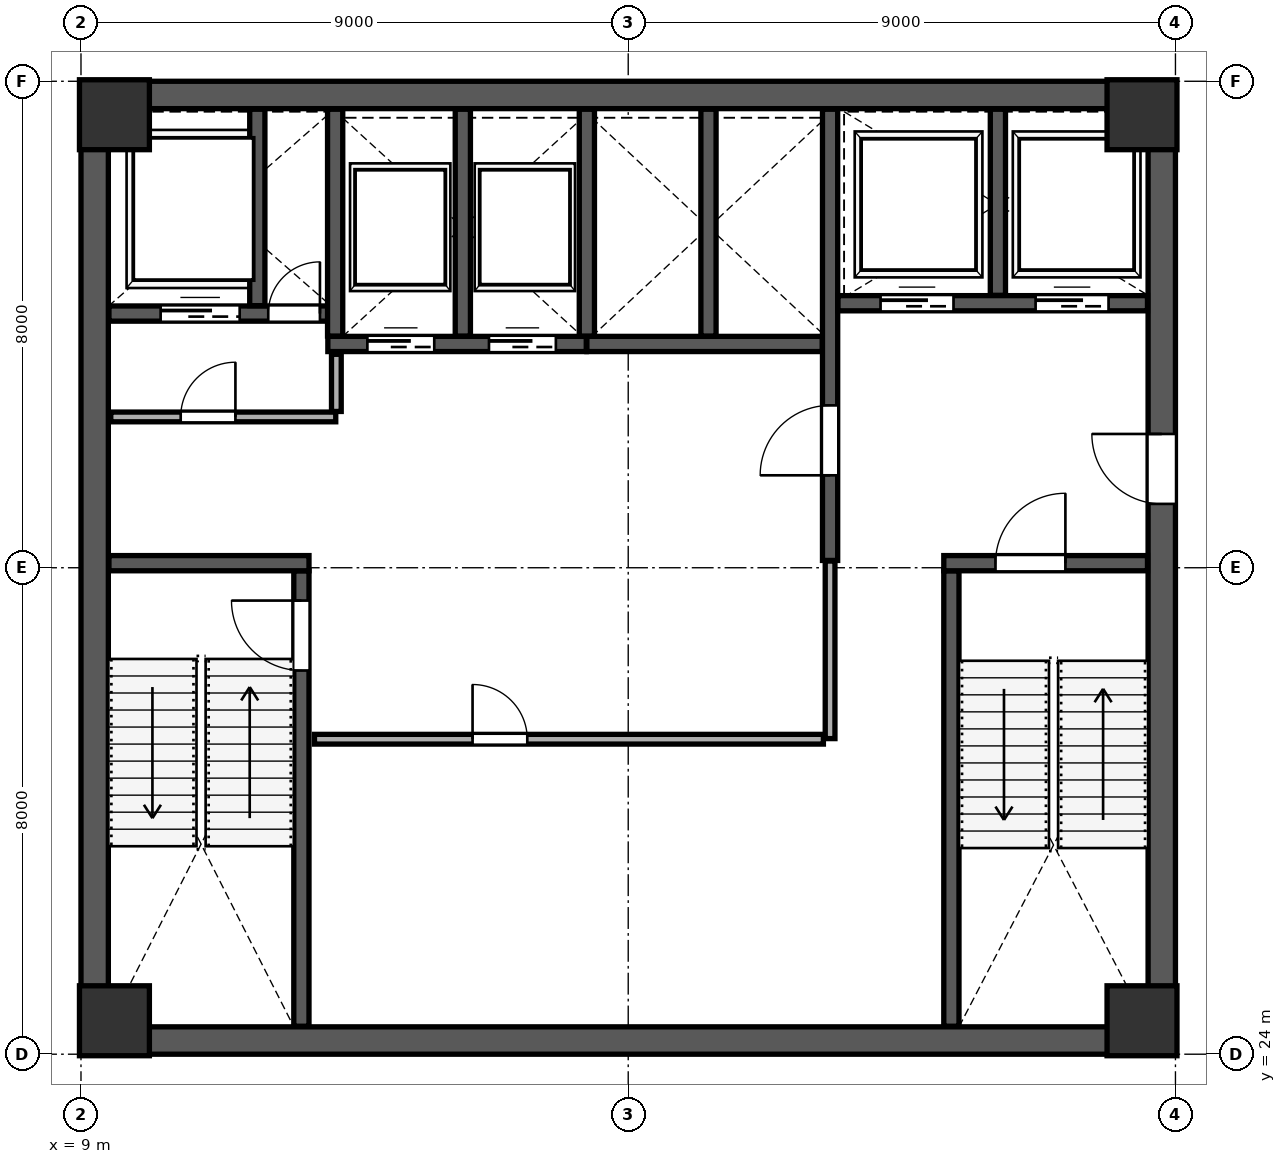
"""IFC4 building model, lengths in metres.
Left out: names, types, materials, properties, quantities, classifications, styles, units other than length and angle.
Written with IfcOpenShell. Run it as: python <this file> out.ifc"""

import sys

from ifc_helpers import new_model, si_unit, direction, frame, frame_2d, origin, origin_2d, place, context, subcontext, project, spatial, rectangle, extrude, source, transform, mapped, element, fill, save


model = new_model("IFC4")
c1 = context("Model", 3, precision=1e-05, world=origin(), true_north=direction((0.0, 1.0)))
c2 = subcontext(c1, "Body", "Model", "MODEL_VIEW")
j1 = project(units=[si_unit("LENGTHUNIT", "METRE"), si_unit("PLANEANGLEUNIT", "RADIAN")], contexts=[c1])
p1 = place(None, origin())
s1 = spatial("IfcSite", under=j1, at=p1, CompositionType="ELEMENT")
p2 = place(p1, origin())
s2 = spatial("IfcBuilding", under=s1, at=p2, CompositionType="ELEMENT")
p3 = place(p2, frame((0.0, 0.0, 149.8)))
s3 = spatial("IfcBuildingStorey", under=s2, at=p3, CompositionType="ELEMENT", Elevation=149.8)
m1 = source(origin(), c2, "Body", "SweptSolid", [
    extrude(rectangle(XDim=1.15, YDim=1.15, at=origin_2d()), origin(), (0.0, 0.0, 1.0), 4.198),
])
for number, where, z_axis, x_axis in (
    (1, (9.55, 24.55, 0.001), (0.0, 0.0, 1.0), (1.0, 0.0, 0.0)),
    (2, (26.45, 24.55, 0.001), (0.0, 0.0, 1.0), (1.0, 0.0, 0.0)),
    (3, (9.55, 39.45, 0.001), (0.0, 0.0, 1.0), (1.0, 0.0, 0.0)),
    (4, (26.45, 39.45, 0.001), (0.0, 0.0, 1.0), (1.0, 0.0, 0.0)),
):
    element("IfcColumn", number, at=place(p3, frame(where, z_axis=z_axis, x_axis=x_axis)), inside=s3, PredefinedType="COLUMN", context=c2, shape_type="MappedRepresentation", body=[
        mapped(m1, transform((0.0, 0.0, 0.0), scale=1.0)),
    ])
p4 = place(p3, frame((9.225, 24.45, 0.0), z_axis=(0.0, 0.0, 1.0), x_axis=(0.0, 1.0, 0.0)))
e5 = element("IfcWall", 5, at=p4, inside=s3, PredefinedType="SHEAR", context=c2, shape_type="SweptSolid", body=[
    extrude(rectangle(XDim=15.1, YDim=0.45, at=frame_2d((7.55, 0.0))), origin(), (0.0, 0.0, 1.0), 3.96),
])
p5 = place(p3, frame((26.775, 24.45, 0.0), z_axis=(0.0, 0.0, 1.0), x_axis=(0.0, 1.0, 0.0)))
e6 = element("IfcWall", 6, at=p5, inside=s3, PredefinedType="SHEAR", context=c2, shape_type="SweptSolid", body=[
    extrude(rectangle(XDim=15.1, YDim=0.45, at=frame_2d((7.55, 0.0))), origin(), (0.0, 0.0, 1.0), 3.96),
])
p6 = place(p5, frame((8.6, 0.0, 0.0)))
e7 = element("IfcOpeningElement", 7, at=p6, cuts=e6, PredefinedType="OPENING", context=c2, shape_type="SweptSolid", body=[
    extrude(rectangle(XDim=1.15, YDim=2.2, at=frame_2d((0.575, 1.1))), frame((0.0, 0.235, 0.0), z_axis=(0.0, -1.0, 0.0), x_axis=(1.0, 0.0, 0.0)), (0.0, 0.0, 1.0), 0.47),
])
for number, where, z_axis, x_axis in (
    (8, (9.0, 24.225, 0.0), (0.0, 0.0, 1.0), (1.0, 0.0, 0.0)),
    (9, (9.0, 39.775, 0.0), (0.0, 0.0, 1.0), (1.0, 0.0, 0.0)),
):
    element("IfcWall", number, at=place(p3, frame(where, z_axis=z_axis, x_axis=x_axis)), inside=s3, PredefinedType="SHEAR", context=c2, shape_type="SweptSolid", body=[
        extrude(rectangle(XDim=18.0, YDim=0.45, at=frame_2d((9.0, 0.0))), origin(), (0.0, 0.0, 1.0), 3.96),
    ])
p7 = place(p3, frame((12.625, 24.46, 0.0), z_axis=(0.0, 0.0, 1.0), x_axis=(0.0, 1.0, 0.0)))
e10 = element("IfcWall", 10, at=p7, inside=s3, PredefinedType="SHEAR", context=c2, shape_type="SweptSolid", body=[
    extrude(rectangle(XDim=7.49, YDim=0.25, at=frame_2d((3.745, 0.0))), origin(), (0.0, 0.0, 1.0), 3.96),
])
p8 = place(p7, frame((5.85, 0.0, 0.0)))
e11 = element("IfcOpeningElement", 11, at=p8, cuts=e10, PredefinedType="OPENING", context=c2, shape_type="SweptSolid", body=[
    extrude(rectangle(XDim=1.15, YDim=2.2, at=frame_2d((0.575, 1.1))), frame((0.0, 0.135, 0.0), z_axis=(0.0, -1.0, 0.0), x_axis=(1.0, 0.0, 0.0)), (0.0, 0.0, 1.0), 0.27),
])
p9 = place(p3, frame((9.46, 32.075, 0.0), z_axis=(0.0, 0.0, 1.0), x_axis=(1.0, 0.0, 0.0)))
e12 = element("IfcWall", 12, at=p9, inside=s3, PredefinedType="SHEAR", context=c2, shape_type="SweptSolid", body=[
    extrude(rectangle(XDim=3.29, YDim=0.25, at=frame_2d((1.645, 0.0))), origin(), (0.0, 0.0, 1.0), 3.96),
])
p10 = place(p3, frame((23.315, 24.46, 0.0), z_axis=(0.0, 0.0, 1.0), x_axis=(0.0, 1.0, 0.0)))
e13 = element("IfcWall", 13, at=p10, inside=s3, PredefinedType="SHEAR", context=c2, shape_type="SweptSolid", body=[
    extrude(rectangle(XDim=7.49, YDim=0.25, at=frame_2d((3.745, 0.0))), origin(), (0.0, 0.0, 1.0), 3.96),
])
p11 = place(p3, frame((23.19, 32.075, 0.0), z_axis=(0.0, 0.0, 1.0), x_axis=(1.0, 0.0, 0.0)))
e14 = element("IfcWall", 14, at=p11, inside=s3, PredefinedType="SHEAR", context=c2, shape_type="SweptSolid", body=[
    extrude(rectangle(XDim=3.35, YDim=0.25, at=frame_2d((1.675, 0.0))), origin(), (0.0, 0.0, 1.0), 3.96),
])
p12 = place(p11, frame((0.85, 0.0, 0.0)))
e15 = element("IfcOpeningElement", 15, at=p12, cuts=e14, PredefinedType="OPENING", context=c2, shape_type="SweptSolid", body=[
    extrude(rectangle(XDim=1.15, YDim=2.2, at=frame_2d((0.575, 1.1))), frame((0.0, 0.135, 0.0), z_axis=(0.0, -1.0, 0.0), x_axis=(1.0, 0.0, 0.0)), (0.0, 0.0, 1.0), 0.27),
])
p13 = place(p3, frame((21.32, 32.12, 0.0), z_axis=(0.0, 0.0, 1.0), x_axis=(0.0, 1.0, 0.0)))
e16 = element("IfcWall", 16, at=p13, inside=s3, PredefinedType="SHEAR", context=c2, shape_type="SweptSolid", body=[
    extrude(rectangle(XDim=7.42, YDim=0.25, at=frame_2d((3.71, 0.0))), origin(), (0.0, 0.0, 1.0), 3.96),
])
p14 = place(p13, frame((1.4, 0.0, 0.0)))
e17 = element("IfcOpeningElement", 17, at=p14, cuts=e16, PredefinedType="OPENING", context=c2, shape_type="SweptSolid", body=[
    extrude(rectangle(XDim=1.15, YDim=2.2, at=frame_2d((0.575, 1.1))), frame((0.0, 0.135, 0.0), z_axis=(0.0, -1.0, 0.0), x_axis=(1.0, 0.0, 0.0)), (0.0, 0.0, 1.0), 0.27),
])
p15 = place(p3, frame((9.46, 36.18, 0.0), z_axis=(0.0, 0.0, 1.0), x_axis=(1.0, 0.0, 0.0)))
e18 = element("IfcWall", 18, at=p15, inside=s3, PredefinedType="SHEAR", context=c2, shape_type="SweptSolid", body=[
    extrude(rectangle(XDim=3.79, YDim=0.25, at=frame_2d((1.895, 0.0))), origin(), (0.0, 0.0, 1.0), 3.96),
])
p16 = place(p15, frame((2.62, 0.0, 0.0)))
e19 = element("IfcOpeningElement", 19, at=p16, cuts=e18, PredefinedType="OPENING", context=c2, shape_type="SweptSolid", body=[
    extrude(rectangle(XDim=0.85, YDim=2.1, at=frame_2d((0.425, 1.05))), frame((0.0, 0.135, 0.0), z_axis=(0.0, -1.0, 0.0), x_axis=(1.0, 0.0, 0.0)), (0.0, 0.0, 1.0), 0.27),
])
p17 = place(p15, frame((0.85, 0.0, 0.0)))
e20 = element("IfcOpeningElement", 20, at=p17, cuts=e18, PredefinedType="OPENING", context=c2, shape_type="SweptSolid", body=[
    extrude(rectangle(XDim=1.3, YDim=2.25, at=frame_2d((0.65, 1.125))), frame((0.0, 0.135, 0.0), z_axis=(0.0, -1.0, 0.0), x_axis=(1.0, 0.0, 0.0)), (0.0, 0.0, 1.0), 0.27),
])
p18 = place(p3, frame((11.9, 36.31, 0.0), z_axis=(0.0, 0.0, 1.0), x_axis=(0.0, 1.0, 0.0)))
e21 = element("IfcWall", 21, at=p18, inside=s3, PredefinedType="SHEAR", context=c2, shape_type="SweptSolid", body=[
    extrude(rectangle(XDim=3.23, YDim=0.25, at=frame_2d((1.615, 0.0))), origin(), (0.0, 0.0, 1.0), 3.96),
])
p19 = place(p3, frame((21.45, 36.35, 0.0), z_axis=(0.0, 0.0, 1.0), x_axis=(1.0, 0.0, 0.0)))
e22 = element("IfcWall", 22, at=p19, inside=s3, PredefinedType="SHEAR", context=c2, shape_type="SweptSolid", body=[
    extrude(rectangle(XDim=5.09, YDim=0.25, at=frame_2d((2.545, 0.0))), origin(), (0.0, 0.0, 1.0), 3.96),
])
p20 = place(p19, frame((0.7, 0.0, 0.0)))
e23 = element("IfcOpeningElement", 23, at=p20, cuts=e22, PredefinedType="OPENING", context=c2, shape_type="SweptSolid", body=[
    extrude(rectangle(XDim=1.2, YDim=2.2, at=frame_2d((0.6, 1.1))), frame((0.0, 0.135, 0.0), z_axis=(0.0, -1.0, 0.0), x_axis=(1.0, 0.0, 0.0)), (0.0, 0.0, 1.0), 0.27),
])
p21 = place(p19, frame((3.25, 0.0, 0.0)))
e24 = element("IfcOpeningElement", 24, at=p21, cuts=e22, PredefinedType="OPENING", context=c2, shape_type="SweptSolid", body=[
    extrude(rectangle(XDim=1.2, YDim=2.2, at=frame_2d((0.6, 1.1))), frame((0.0, 0.135, 0.0), z_axis=(0.0, -1.0, 0.0), x_axis=(1.0, 0.0, 0.0)), (0.0, 0.0, 1.0), 0.27),
])
p22 = place(p3, frame((24.08, 36.48, 0.0), z_axis=(0.0, 0.0, 1.0), x_axis=(0.0, 1.0, 0.0)))
e25 = element("IfcWall", 25, at=p22, inside=s3, PredefinedType="SHEAR", context=c2, shape_type="SweptSolid", body=[
    extrude(rectangle(XDim=3.06, YDim=0.25, at=frame_2d((1.53, 0.0))), origin(), (0.0, 0.0, 1.0), 3.96),
])
p23 = place(p3, frame((13.06, 35.68, 0.0), z_axis=(0.0, 0.0, 1.0), x_axis=(1.0, 0.0, 0.0)))
e26 = element("IfcWall", 26, at=p23, inside=s3, PredefinedType="SHEAR", context=c2, shape_type="SweptSolid", body=[
    extrude(rectangle(XDim=4.25, YDim=0.25, at=frame_2d((2.125, 0.0))), origin(), (0.0, 0.0, 1.0), 3.96),
])
p24 = place(p23, frame((0.65, 0.0, 0.0)))
e27 = element("IfcOpeningElement", 27, at=p24, cuts=e26, PredefinedType="OPENING", context=c2, shape_type="SweptSolid", body=[
    extrude(rectangle(XDim=1.1, YDim=2.2, at=frame_2d((0.55, 1.1))), frame((0.0, 0.135, 0.0), z_axis=(0.0, -1.0, 0.0), x_axis=(1.0, 0.0, 0.0)), (0.0, 0.0, 1.0), 0.27),
])
p25 = place(p23, frame((2.65, 0.0, 0.0)))
e28 = element("IfcOpeningElement", 28, at=p25, cuts=e26, PredefinedType="OPENING", context=c2, shape_type="SweptSolid", body=[
    extrude(rectangle(XDim=1.1, YDim=2.2, at=frame_2d((0.55, 1.1))), frame((0.0, 0.135, 0.0), z_axis=(0.0, -1.0, 0.0), x_axis=(1.0, 0.0, 0.0)), (0.0, 0.0, 1.0), 0.27),
])
for number, where, z_axis, x_axis in (
    (29, (13.18, 35.81, 0.0), (0.0, 0.0, 1.0), (0.0, 1.0, 0.0)),
    (30, (15.28, 35.81, 0.0), (0.0, 0.0, 1.0), (0.0, 1.0, 0.0)),
):
    element("IfcWall", number, at=place(p3, frame(where, z_axis=z_axis, x_axis=x_axis)), inside=s3, PredefinedType="SHEAR", context=c2, shape_type="SweptSolid", body=[
        extrude(rectangle(XDim=3.73, YDim=0.25, at=frame_2d((1.865, 0.0))), origin(), (0.0, 0.0, 1.0), 3.96),
    ])
p26 = place(p3, frame((17.32, 35.68, 0.0), z_axis=(0.0, 0.0, 1.0), x_axis=(1.0, 0.0, 0.0)))
e31 = element("IfcWall", 31, at=p26, inside=s3, PredefinedType="SHEAR", context=c2, shape_type="SweptSolid", body=[
    extrude(rectangle(XDim=3.87, YDim=0.25, at=frame_2d((1.935, 0.0))), origin(), (0.0, 0.0, 1.0), 3.96),
])
for number, where, z_axis, x_axis in (
    (32, (17.32, 35.81, 0.0), (0.0, 0.0, 1.0), (0.0, 1.0, 0.0)),
    (33, (19.32, 35.81, 0.0), (0.0, 0.0, 1.0), (0.0, 1.0, 0.0)),
):
    element("IfcWall", number, at=place(p3, frame(where, z_axis=z_axis, x_axis=x_axis)), inside=s3, PredefinedType="SHEAR", context=c2, shape_type="SweptSolid", body=[
        extrude(rectangle(XDim=3.73, YDim=0.25, at=frame_2d((1.865, 0.0))), origin(), (0.0, 0.0, 1.0), 3.96),
    ])
p27 = place(p3, frame((9.49, 34.48, 0.0), z_axis=(0.0, 0.0, 1.0), x_axis=(1.0, 0.0, 0.0)))
e34 = element("IfcWall", 34, at=p27, inside=s3, PredefinedType="PARTITIONING", context=c2, shape_type="SweptSolid", body=[
    extrude(rectangle(XDim=3.7, YDim=0.16, at=frame_2d((1.85, 0.0))), origin(), (0.0, 0.0, 1.0), 3.96),
])
p28 = place(p27, frame((1.15, 0.0, 0.0)))
e35 = element("IfcOpeningElement", 35, at=p28, cuts=e34, PredefinedType="OPENING", context=c2, shape_type="SweptSolid", body=[
    extrude(rectangle(XDim=0.9, YDim=2.15, at=frame_2d((0.45, 1.075))), frame((0.0, 0.09, 0.0), z_axis=(0.0, -1.0, 0.0), x_axis=(1.0, 0.0, 0.0)), (0.0, 0.0, 1.0), 0.18),
])
p29 = place(p3, frame((13.2, 34.57, 0.0), z_axis=(0.0, 0.0, 1.0), x_axis=(0.0, 1.0, 0.0)))
e36 = element("IfcWall", 36, at=p29, inside=s3, PredefinedType="PARTITIONING", context=c2, shape_type="SweptSolid", body=[
    extrude(rectangle(XDim=0.94, YDim=0.16, at=frame_2d((0.47, 0.0))), origin(), (0.0, 0.0, 1.0), 3.96),
])
p30 = place(p3, frame((12.84, 29.18, 0.0), z_axis=(0.0, 0.0, 1.0), x_axis=(1.0, 0.0, 0.0)))
e37 = element("IfcWall", 37, at=p30, inside=s3, PredefinedType="PARTITIONING", context=c2, shape_type="SweptSolid", body=[
    extrude(rectangle(XDim=8.37, YDim=0.16, at=frame_2d((4.185, 0.0))), origin(), (0.0, 0.0, 1.0), 3.96),
])
p31 = place(p30, frame((2.6, 0.0, 0.0)))
e38 = element("IfcOpeningElement", 38, at=p31, cuts=e37, PredefinedType="OPENING", context=c2, shape_type="SweptSolid", body=[
    extrude(rectangle(XDim=0.9, YDim=2.15, at=frame_2d((0.45, 1.075))), frame((0.0, 0.09, 0.0), z_axis=(0.0, -1.0, 0.0), x_axis=(1.0, 0.0, 0.0)), (0.0, 0.0, 1.0), 0.18),
])
p32 = place(p3, frame((21.32, 29.19, 0.0), z_axis=(0.0, 0.0, 1.0), x_axis=(0.0, 1.0, 0.0)))
e39 = element("IfcWall", 39, at=p32, inside=s3, PredefinedType="PARTITIONING", context=c2, shape_type="SweptSolid", body=[
    extrude(rectangle(XDim=2.92, YDim=0.16, at=frame_2d((1.46, 0.0))), origin(), (0.0, 0.0, 1.0), 3.96),
])
p33 = place(p3, frame((9.523, 48.867, 0.0), z_axis=(0.0, 0.0, 1.0), x_axis=(0.923882225555, -0.382676930718, 0.0)))
e40 = element("IfcWall", 40, at=p33, inside=s3, PredefinedType="PARTITIONING", context=c2, shape_type="SweptSolid", body=[
    extrude(rectangle(XDim=27.61, YDim=0.115, at=frame_2d((13.805, 0.0))), origin(), (0.0, 0.0, 1.0), 3.96),
])
p34 = place(p33, frame((20.31, 0.0, 0.0)))
e41 = element("IfcOpeningElement", 41, at=p34, cuts=e40, PredefinedType="OPENING", context=c2, shape_type="SweptSolid", body=[
    extrude(rectangle(XDim=0.95, YDim=2.15, at=frame_2d((0.475, 1.075))), frame((0.0, 0.067, 0.0), z_axis=(0.0, -1.0, 0.0), x_axis=(1.0, 0.0, 0.0)), (0.0, 0.0, 1.0), 0.135),
])
p35 = place(p3, frame((23.963, 11.475, 0.0), z_axis=(0.0, 0.0, 1.0), x_axis=(0.382686018031, 0.923878461489, 0.0)))
e42 = element("IfcWall", 42, at=p35, inside=s3, PredefinedType="PARTITIONING", context=c2, shape_type="SweptSolid", body=[
    extrude(rectangle(XDim=14.58, YDim=0.16, at=frame_2d((7.29, 0.0))), origin(), (0.0, 0.0, 1.0), 3.96),
])
m2 = source(origin(), c2, "Body", "SweptSolid", [
    extrude(rectangle(XDim=1.15, YDim=2.2, at=frame_2d((0.575, 1.1))), frame((0.0, 0.025, 0.0), z_axis=(0.0, -1.0, 0.0), x_axis=(1.0, 0.0, 0.0)), (0.0, 0.0, 1.0), 0.05),
])
p36 = place(p8, origin())
e43 = element("IfcDoor", 43, at=p36, inside=s3, OperationType="SINGLE_SWING_RIGHT", PredefinedType="DOOR", context=c2, shape_type="MappedRepresentation", body=[
    mapped(m2, transform((0.0, 0.0, 0.0), scale=1.0)),
])
fill(e11, e43)
m3 = source(origin(), c2, "Body", "SweptSolid", [
    extrude(rectangle(XDim=1.15, YDim=2.2, at=frame_2d((0.575, 1.1))), frame((0.0, 0.025, 0.0), z_axis=(0.0, -1.0, 0.0), x_axis=(1.0, 0.0, 0.0)), (0.0, 0.0, 1.0), 0.05),
])
p37 = place(p14, origin())
e44 = element("IfcDoor", 44, at=p37, inside=s3, OperationType="SINGLE_SWING_LEFT", PredefinedType="DOOR", context=c2, shape_type="MappedRepresentation", body=[
    mapped(m3, transform((0.0, 0.0, 0.0), scale=1.0)),
])
fill(e17, e44)
p38 = place(p12, origin())
e45 = element("IfcDoor", 45, at=p38, inside=s3, OperationType="SINGLE_SWING_RIGHT", PredefinedType="DOOR", context=c2, shape_type="MappedRepresentation", body=[
    mapped(m2, transform((0.0, 0.0, 0.0), scale=1.0)),
])
fill(e15, e45)
p39 = place(p6, origin())
e46 = element("IfcDoor", 46, at=p39, inside=s3, OperationType="SINGLE_SWING_RIGHT", PredefinedType="DOOR", context=c2, shape_type="MappedRepresentation", body=[
    mapped(m3, transform((0.0, 0.0, 0.0), scale=1.0)),
])
fill(e7, e46)
m4 = source(origin(), c2, "Body", "SweptSolid", [
    extrude(rectangle(XDim=0.85, YDim=2.1, at=frame_2d((0.425, 1.05))), frame((0.0, 0.025, 0.0), z_axis=(0.0, -1.0, 0.0), x_axis=(1.0, 0.0, 0.0)), (0.0, 0.0, 1.0), 0.05),
])
p40 = place(p16, origin())
e47 = element("IfcDoor", 47, at=p40, inside=s3, OperationType="SINGLE_SWING_RIGHT", PredefinedType="DOOR", context=c2, shape_type="MappedRepresentation", body=[
    mapped(m4, transform((0.0, 0.0, 0.0), scale=1.0)),
])
fill(e19, e47)
m5 = source(origin(), c2, "Body", "SweptSolid", [
    extrude(rectangle(XDim=1.1, YDim=2.2, at=frame_2d((0.55, 1.1))), frame((0.0, 0.025, 0.0), z_axis=(0.0, -1.0, 0.0), x_axis=(1.0, 0.0, 0.0)), (0.0, 0.0, 1.0), 0.05),
])
p41 = place(p24, origin())
e48 = element("IfcDoor", 48, at=p41, inside=s3, OperationType="SLIDING_TO_LEFT", PredefinedType="DOOR", context=c2, shape_type="MappedRepresentation", body=[
    mapped(m5, transform((0.0, 0.0, 0.0), scale=1.0)),
])
fill(e27, e48)
p42 = place(p25, origin())
e49 = element("IfcDoor", 49, at=p42, inside=s3, OperationType="SLIDING_TO_RIGHT", PredefinedType="DOOR", context=c2, shape_type="MappedRepresentation", body=[
    mapped(m5, transform((0.0, 0.0, 0.0), scale=1.0)),
])
fill(e28, e49)
m6 = source(origin(), c2, "Body", "SweptSolid", [
    extrude(rectangle(XDim=1.2, YDim=2.2, at=frame_2d((0.6, 1.1))), frame((0.0, 0.025, 0.0), z_axis=(0.0, -1.0, 0.0), x_axis=(1.0, 0.0, 0.0)), (0.0, 0.0, 1.0), 0.05),
])
p43 = place(p20, origin())
e50 = element("IfcDoor", 50, at=p43, inside=s3, OperationType="SLIDING_TO_LEFT", PredefinedType="DOOR", context=c2, shape_type="MappedRepresentation", body=[
    mapped(m6, transform((0.0, 0.0, 0.0), scale=1.0)),
])
fill(e23, e50)
p44 = place(p21, origin())
e51 = element("IfcDoor", 51, at=p44, inside=s3, OperationType="SLIDING_TO_RIGHT", PredefinedType="DOOR", context=c2, shape_type="MappedRepresentation", body=[
    mapped(m6, transform((0.0, 0.0, 0.0), scale=1.0)),
])
fill(e24, e51)
m7 = source(origin(), c2, "Body", "SweptSolid", [
    extrude(rectangle(XDim=1.3, YDim=2.25, at=frame_2d((0.65, 1.125))), frame((0.0, 0.025, 0.0), z_axis=(0.0, -1.0, 0.0), x_axis=(1.0, 0.0, 0.0)), (0.0, 0.0, 1.0), 0.05),
])
p45 = place(p17, origin())
e52 = element("IfcDoor", 52, at=p45, inside=s3, OperationType="SLIDING_TO_LEFT", PredefinedType="DOOR", context=c2, shape_type="MappedRepresentation", body=[
    mapped(m7, transform((0.0, 0.0, 0.0), scale=1.0)),
])
fill(e20, e52)
m8 = source(origin(), c2, "Body", "SweptSolid", [
    extrude(rectangle(XDim=0.9, YDim=2.15, at=frame_2d((0.45, 1.075))), frame((0.0, 0.025, 0.0), z_axis=(0.0, -1.0, 0.0), x_axis=(1.0, 0.0, 0.0)), (0.0, 0.0, 1.0), 0.05),
])
p46 = place(p28, origin())
e53 = element("IfcDoor", 53, at=p46, inside=s3, OperationType="SINGLE_SWING_RIGHT", PredefinedType="DOOR", context=c2, shape_type="MappedRepresentation", body=[
    mapped(m8, transform((0.0, 0.0, 0.0), scale=1.0)),
])
fill(e35, e53)
p47 = place(p31, origin())
e54 = element("IfcDoor", 54, at=p47, inside=s3, OperationType="SINGLE_SWING_LEFT", PredefinedType="DOOR", context=c2, shape_type="MappedRepresentation", body=[
    mapped(m8, transform((0.0, 0.0, 0.0), scale=1.0)),
])
fill(e38, e54)
save(model, sys.argv[1])
